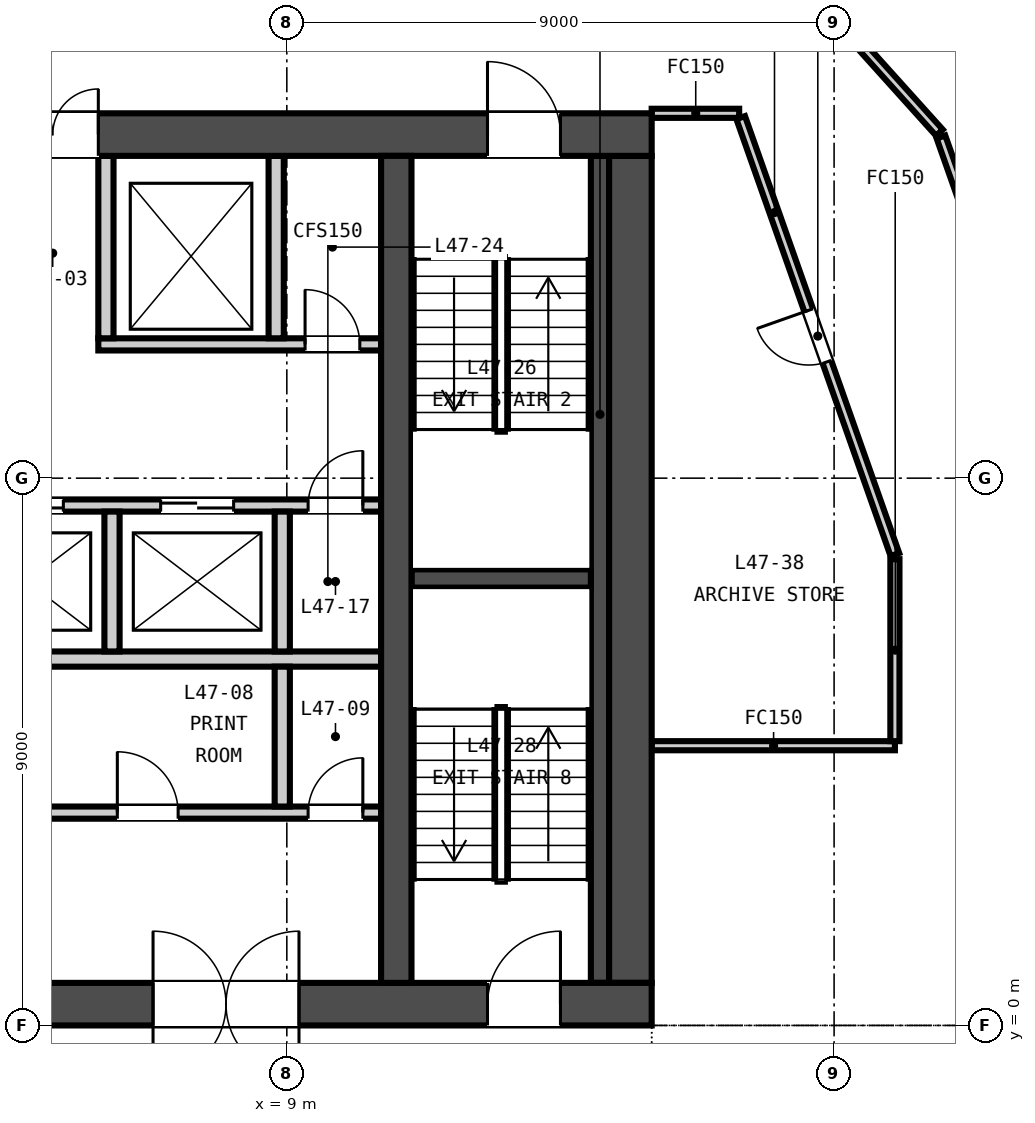
"""IFC4 building model, lengths in metres.
Left out: names, types, materials, properties, quantities, classifications, styles, units other than length and angle.
Written with IfcOpenShell. Run it as: python <this file> out.ifc"""

import sys

from ifc_helpers import new_model, si_unit, direction, frame, frame_2d, origin, place, context, subcontext, project, spatial, rectangle, extrude, element, fill, save


model = new_model("IFC4")
c1 = context("Model", 3, precision=1e-05, world=origin(), true_north=direction((0.0, 1.0)))
c2 = subcontext(c1, "Body", "Model", "MODEL_VIEW")
j1 = project(units=[si_unit("LENGTHUNIT", "METRE"), si_unit("PLANEANGLEUNIT", "RADIAN")], contexts=[c1])
p1 = place(None, origin())
s1 = spatial("IfcSite", under=j1, at=p1, CompositionType="ELEMENT")
p2 = place(p1, origin())
s2 = spatial("IfcBuilding", under=s1, at=p2, CompositionType="ELEMENT")
p3 = place(p2, frame((0.0, 0.0, 189.05)))
s3 = spatial("IfcBuildingStorey", under=s2, at=p3, CompositionType="ELEMENT", Elevation=189.05)
p4 = place(p3, frame((-15.0, 0.35, -0.15), z_axis=(0.0, 0.0, 1.0), x_axis=(1.0, 0.0, 0.0)))
e1 = element("IfcWall", 1, at=p4, inside=s3, PredefinedType="SOLIDWALL", context=c2, shape_type="SweptSolid", body=[
    extrude(rectangle(XDim=30.0, YDim=0.7, at=frame_2d((15.0, 0.0))), origin(), (0.0, 0.0, 1.0), 3.65),
])
p5 = place(p4, frame((5.8, 0.0, 0.15)))
e2 = element("IfcOpeningElement", 2, at=p5, cuts=e1, PredefinedType="OPENING", context=c2, shape_type="SweptSolid", body=[
    extrude(rectangle(XDim=2.4, YDim=2.4, at=frame_2d((1.2, 1.2))), frame((0.0, 0.36, 0.0), z_axis=(0.0, -1.0, 0.0), x_axis=(1.0, 0.0, 0.0)), (0.0, 0.0, 1.0), 0.72),
])
p6 = place(p4, frame((13.8, 0.0, 0.15)))
e3 = element("IfcOpeningElement", 3, at=p6, cuts=e1, PredefinedType="OPENING", context=c2, shape_type="SweptSolid", body=[
    extrude(rectangle(XDim=2.4, YDim=2.4, at=frame_2d((1.2, 1.2))), frame((0.0, 0.36, 0.0), z_axis=(0.0, -1.0, 0.0), x_axis=(1.0, 0.0, 0.0)), (0.0, 0.0, 1.0), 0.72),
])
p7 = place(p4, frame((21.8, 0.0, 0.15)))
e4 = element("IfcOpeningElement", 4, at=p7, cuts=e1, PredefinedType="OPENING", context=c2, shape_type="SweptSolid", body=[
    extrude(rectangle(XDim=2.4, YDim=2.4, at=frame_2d((1.2, 1.2))), frame((0.0, 0.36, 0.0), z_axis=(0.0, -1.0, 0.0), x_axis=(1.0, 0.0, 0.0)), (0.0, 0.0, 1.0), 0.72),
])
p8 = place(p4, frame((1.5, 0.0, 0.15)))
e5 = element("IfcOpeningElement", 5, at=p8, cuts=e1, PredefinedType="OPENING", context=c2, shape_type="SweptSolid", body=[
    extrude(rectangle(XDim=1.2, YDim=2.1, at=frame_2d((0.6, 1.05))), frame((0.0, 0.36, 0.0), z_axis=(0.0, -1.0, 0.0), x_axis=(1.0, 0.0, 0.0)), (0.0, 0.0, 1.0), 0.72),
])
p9 = place(p4, frame((27.3, 0.0, 0.15)))
e6 = element("IfcOpeningElement", 6, at=p9, cuts=e1, PredefinedType="OPENING", context=c2, shape_type="SweptSolid", body=[
    extrude(rectangle(XDim=1.2, YDim=2.1, at=frame_2d((0.6, 1.05))), frame((0.0, 0.36, 0.0), z_axis=(0.0, -1.0, 0.0), x_axis=(1.0, 0.0, 0.0)), (0.0, 0.0, 1.0), 0.72),
])
p10 = place(p3, frame((-15.0, 14.65, -0.15), z_axis=(0.0, 0.0, 1.0), x_axis=(1.0, 0.0, 0.0)))
e7 = element("IfcWall", 7, at=p10, inside=s3, PredefinedType="SOLIDWALL", context=c2, shape_type="SweptSolid", body=[
    extrude(rectangle(XDim=30.0, YDim=0.7, at=frame_2d((15.0, 0.0))), origin(), (0.0, 0.0, 1.0), 3.65),
])
p11 = place(p10, frame((9.25, 0.0, 0.15)))
e8 = element("IfcOpeningElement", 8, at=p11, cuts=e7, PredefinedType="OPENING", context=c2, shape_type="SweptSolid", body=[
    extrude(rectangle(XDim=1.5, YDim=2.1, at=frame_2d((0.75, 1.05))), frame((0.0, 0.36, 0.0), z_axis=(0.0, -1.0, 0.0), x_axis=(1.0, 0.0, 0.0)), (0.0, 0.0, 1.0), 0.72),
])
p12 = place(p10, frame((19.4, 0.0, 0.15)))
e9 = element("IfcOpeningElement", 9, at=p12, cuts=e7, PredefinedType="OPENING", context=c2, shape_type="SweptSolid", body=[
    extrude(rectangle(XDim=1.5, YDim=2.1, at=frame_2d((0.75, 1.05))), frame((0.0, 0.36, 0.0), z_axis=(0.0, -1.0, 0.0), x_axis=(1.0, 0.0, 0.0)), (0.0, 0.0, 1.0), 0.72),
])
p13 = place(p10, frame((1.5, 0.0, 0.15)))
e10 = element("IfcOpeningElement", 10, at=p13, cuts=e7, PredefinedType="OPENING", context=c2, shape_type="SweptSolid", body=[
    extrude(rectangle(XDim=1.2, YDim=2.1, at=frame_2d((0.6, 1.05))), frame((0.0, 0.36, 0.0), z_axis=(0.0, -1.0, 0.0), x_axis=(1.0, 0.0, 0.0)), (0.0, 0.0, 1.0), 0.72),
])
p14 = place(p10, frame((27.3, 0.0, 0.15)))
e11 = element("IfcOpeningElement", 11, at=p14, cuts=e7, PredefinedType="OPENING", context=c2, shape_type="SweptSolid", body=[
    extrude(rectangle(XDim=1.2, YDim=2.1, at=frame_2d((0.6, 1.05))), frame((0.0, 0.36, 0.0), z_axis=(0.0, -1.0, 0.0), x_axis=(1.0, 0.0, 0.0)), (0.0, 0.0, 1.0), 0.72),
])
p15 = place(p3, frame((14.65, 0.7, -0.15), z_axis=(0.0, 0.0, 1.0), x_axis=(0.0, 1.0, 0.0)))
e12 = element("IfcWall", 12, at=p15, inside=s3, PredefinedType="SOLIDWALL", context=c2, shape_type="SweptSolid", body=[
    extrude(rectangle(XDim=13.6, YDim=0.7, at=frame_2d((6.8, 0.0))), origin(), (0.0, 0.0, 1.0), 3.65),
])
p16 = place(p3, frame((10.8, 0.7, -0.15), z_axis=(0.0, 0.0, 1.0), x_axis=(0.0, 1.0, 0.0)))
e13 = element("IfcWall", 13, at=p16, inside=s3, PredefinedType="SOLIDWALL", context=c2, shape_type="SweptSolid", body=[
    extrude(rectangle(XDim=13.6, YDim=0.5, at=frame_2d((6.8, 0.0))), origin(), (0.0, 0.0, 1.0), 3.65),
])
p17 = place(p3, frame((-10.55, 3.5, 0.0), z_axis=(0.0, 0.0, 1.0), x_axis=(1.0, 0.0, 0.0)))
e14 = element("IfcWall", 14, at=p17, inside=s3, PredefinedType="PARTITIONING", context=c2, shape_type="SweptSolid", body=[
    extrude(rectangle(XDim=21.1, YDim=0.2, at=frame_2d((10.55, 0.0))), origin(), (0.0, 0.0, 1.0), 3.5),
])
p18 = place(p17, frame((1.113, 0.0, 0.0)))
e15 = element("IfcOpeningElement", 15, at=p18, cuts=e14, PredefinedType="OPENING", context=c2, shape_type="SweptSolid", body=[
    extrude(rectangle(XDim=1.0, YDim=2.1, at=frame_2d((0.5, 1.05))), frame((0.0, 0.11, 0.0), z_axis=(0.0, -1.0, 0.0), x_axis=(1.0, 0.0, 0.0)), (0.0, 0.0, 1.0), 0.22),
])
p19 = place(p17, frame((5.15, 0.0, 0.0)))
e16 = element("IfcOpeningElement", 16, at=p19, cuts=e14, PredefinedType="OPENING", context=c2, shape_type="SweptSolid", body=[
    extrude(rectangle(XDim=1.0, YDim=2.1, at=frame_2d((0.5, 1.05))), frame((0.0, 0.11, 0.0), z_axis=(0.0, -1.0, 0.0), x_axis=(1.0, 0.0, 0.0)), (0.0, 0.0, 1.0), 0.22),
])
p20 = place(p17, frame((9.85, 0.0, 0.0)))
e17 = element("IfcOpeningElement", 17, at=p20, cuts=e14, PredefinedType="OPENING", context=c2, shape_type="SweptSolid", body=[
    extrude(rectangle(XDim=1.0, YDim=2.1, at=frame_2d((0.5, 1.05))), frame((0.0, 0.11, 0.0), z_axis=(0.0, -1.0, 0.0), x_axis=(1.0, 0.0, 0.0)), (0.0, 0.0, 1.0), 0.22),
])
p21 = place(p17, frame((13.4, 0.0, 0.0)))
e18 = element("IfcOpeningElement", 18, at=p21, cuts=e14, PredefinedType="OPENING", context=c2, shape_type="SweptSolid", body=[
    extrude(rectangle(XDim=1.0, YDim=2.1, at=frame_2d((0.5, 1.05))), frame((0.0, 0.11, 0.0), z_axis=(0.0, -1.0, 0.0), x_axis=(1.0, 0.0, 0.0)), (0.0, 0.0, 1.0), 0.22),
])
p22 = place(p17, frame((16.762, 0.0, 0.0)))
e19 = element("IfcOpeningElement", 19, at=p22, cuts=e14, PredefinedType="OPENING", context=c2, shape_type="SweptSolid", body=[
    extrude(rectangle(XDim=1.0, YDim=2.1, at=frame_2d((0.5, 1.05))), frame((0.0, 0.11, 0.0), z_axis=(0.0, -1.0, 0.0), x_axis=(1.0, 0.0, 0.0)), (0.0, 0.0, 1.0), 0.22),
])
p23 = place(p17, frame((19.9, 0.0, 0.0)))
e20 = element("IfcOpeningElement", 20, at=p23, cuts=e14, PredefinedType="OPENING", context=c2, shape_type="SweptSolid", body=[
    extrude(rectangle(XDim=0.9, YDim=2.1, at=frame_2d((0.45, 1.05))), frame((0.0, 0.11, 0.0), z_axis=(0.0, -1.0, 0.0), x_axis=(1.0, 0.0, 0.0)), (0.0, 0.0, 1.0), 0.22),
])
p24 = place(p3, frame((-10.55, 6.025, 0.0), z_axis=(0.0, 0.0, 1.0), x_axis=(1.0, 0.0, 0.0)))
e21 = element("IfcWall", 21, at=p24, inside=s3, PredefinedType="PARTITIONING", context=c2, shape_type="SweptSolid", body=[
    extrude(rectangle(XDim=21.1, YDim=0.25, at=frame_2d((10.55, 0.0))), origin(), (0.0, 0.0, 1.0), 3.5),
])
p25 = place(p3, frame((-10.55, 8.55, 0.0), z_axis=(0.0, 0.0, 1.0), x_axis=(1.0, 0.0, 0.0)))
e22 = element("IfcWall", 22, at=p25, inside=s3, PredefinedType="PARTITIONING", context=c2, shape_type="SweptSolid", body=[
    extrude(rectangle(XDim=21.1, YDim=0.2, at=frame_2d((10.55, 0.0))), origin(), (0.0, 0.0, 1.0), 3.5),
])
p26 = place(p25, frame((0.675, 0.0, 0.0)))
e23 = element("IfcOpeningElement", 23, at=p26, cuts=e22, PredefinedType="OPENING", context=c2, shape_type="SweptSolid", body=[
    extrude(rectangle(XDim=1.2, YDim=2.1, at=frame_2d((0.6, 1.05))), frame((0.0, 0.11, 0.0), z_axis=(0.0, -1.0, 0.0), x_axis=(1.0, 0.0, 0.0)), (0.0, 0.0, 1.0), 0.22),
])
p27 = place(p25, frame((3.475, 0.0, 0.0)))
e24 = element("IfcOpeningElement", 24, at=p27, cuts=e22, PredefinedType="OPENING", context=c2, shape_type="SweptSolid", body=[
    extrude(rectangle(XDim=1.2, YDim=2.1, at=frame_2d((0.6, 1.05))), frame((0.0, 0.11, 0.0), z_axis=(0.0, -1.0, 0.0), x_axis=(1.0, 0.0, 0.0)), (0.0, 0.0, 1.0), 0.22),
])
p28 = place(p25, frame((6.275, 0.0, 0.0)))
e25 = element("IfcOpeningElement", 25, at=p28, cuts=e22, PredefinedType="OPENING", context=c2, shape_type="SweptSolid", body=[
    extrude(rectangle(XDim=1.2, YDim=2.1, at=frame_2d((0.6, 1.05))), frame((0.0, 0.11, 0.0), z_axis=(0.0, -1.0, 0.0), x_axis=(1.0, 0.0, 0.0)), (0.0, 0.0, 1.0), 0.22),
])
p29 = place(p25, frame((9.075, 0.0, 0.0)))
e26 = element("IfcOpeningElement", 26, at=p29, cuts=e22, PredefinedType="OPENING", context=c2, shape_type="SweptSolid", body=[
    extrude(rectangle(XDim=1.2, YDim=2.1, at=frame_2d((0.6, 1.05))), frame((0.0, 0.11, 0.0), z_axis=(0.0, -1.0, 0.0), x_axis=(1.0, 0.0, 0.0)), (0.0, 0.0, 1.0), 0.22),
])
p30 = place(p25, frame((11.875, 0.0, 0.0)))
e27 = element("IfcOpeningElement", 27, at=p30, cuts=e22, PredefinedType="OPENING", context=c2, shape_type="SweptSolid", body=[
    extrude(rectangle(XDim=1.2, YDim=2.1, at=frame_2d((0.6, 1.05))), frame((0.0, 0.11, 0.0), z_axis=(0.0, -1.0, 0.0), x_axis=(1.0, 0.0, 0.0)), (0.0, 0.0, 1.0), 0.22),
])
p31 = place(p25, frame((14.675, 0.0, 0.0)))
e28 = element("IfcOpeningElement", 28, at=p31, cuts=e22, PredefinedType="OPENING", context=c2, shape_type="SweptSolid", body=[
    extrude(rectangle(XDim=1.2, YDim=2.1, at=frame_2d((0.6, 1.05))), frame((0.0, 0.11, 0.0), z_axis=(0.0, -1.0, 0.0), x_axis=(1.0, 0.0, 0.0)), (0.0, 0.0, 1.0), 0.22),
])
p32 = place(p25, frame((17.475, 0.0, 0.0)))
e29 = element("IfcOpeningElement", 29, at=p32, cuts=e22, PredefinedType="OPENING", context=c2, shape_type="SweptSolid", body=[
    extrude(rectangle(XDim=1.2, YDim=2.1, at=frame_2d((0.6, 1.05))), frame((0.0, 0.11, 0.0), z_axis=(0.0, -1.0, 0.0), x_axis=(1.0, 0.0, 0.0)), (0.0, 0.0, 1.0), 0.22),
])
p33 = place(p25, frame((19.9, 0.0, 0.0)))
e30 = element("IfcOpeningElement", 30, at=p33, cuts=e22, PredefinedType="OPENING", context=c2, shape_type="SweptSolid", body=[
    extrude(rectangle(XDim=0.9, YDim=2.1, at=frame_2d((0.45, 1.05))), frame((0.0, 0.11, 0.0), z_axis=(0.0, -1.0, 0.0), x_axis=(1.0, 0.0, 0.0)), (0.0, 0.0, 1.0), 0.22),
])
p34 = place(p3, frame((5.9, 11.2, 0.0), z_axis=(0.0, 0.0, 1.0), x_axis=(1.0, 0.0, 0.0)))
e31 = element("IfcWall", 31, at=p34, inside=s3, PredefinedType="PARTITIONING", context=c2, shape_type="SweptSolid", body=[
    extrude(rectangle(XDim=4.65, YDim=0.2, at=frame_2d((2.325, 0.0))), origin(), (0.0, 0.0, 1.0), 3.5),
])
p35 = place(p34, frame((3.4, 0.0, 0.0)))
e32 = element("IfcOpeningElement", 32, at=p35, cuts=e31, PredefinedType="OPENING", context=c2, shape_type="SweptSolid", body=[
    extrude(rectangle(XDim=0.9, YDim=2.1, at=frame_2d((0.45, 1.05))), frame((0.0, 0.11, 0.0), z_axis=(0.0, -1.0, 0.0), x_axis=(1.0, 0.0, 0.0)), (0.0, 0.0, 1.0), 0.22),
])
p36 = place(p3, frame((8.925, 3.6, 0.0), z_axis=(0.0, 0.0, 1.0), x_axis=(0.0, 1.0, 0.0)))
e33 = element("IfcWall", 33, at=p36, inside=s3, PredefinedType="PARTITIONING", context=c2, shape_type="SweptSolid", body=[
    extrude(rectangle(XDim=2.3, YDim=0.25, at=frame_2d((1.15, 0.0))), origin(), (0.0, 0.0, 1.0), 3.5),
])
for number, where, z_axis, x_axis in (
    (34, (6.125, 6.15, 0.0), (0.0, 0.0, 1.0), (0.0, 1.0, 0.0)),
    (35, (8.925, 6.15, 0.0), (0.0, 0.0, 1.0), (0.0, 1.0, 0.0)),
):
    element("IfcWall", number, at=place(p3, frame(where, z_axis=z_axis, x_axis=x_axis)), inside=s3, PredefinedType="PARTITIONING", context=c2, shape_type="SweptSolid", body=[
        extrude(rectangle(XDim=2.3, YDim=0.25, at=frame_2d((1.15, 0.0))), origin(), (0.0, 0.0, 1.0), 3.5),
    ])
for number, where, z_axis, x_axis in (
    (36, (6.025, 11.3, 0.0), (0.0, 0.0, 1.0), (0.0, 1.0, 0.0)),
    (37, (8.825, 11.3, 0.0), (0.0, 0.0, 1.0), (0.0, 1.0, 0.0)),
):
    element("IfcWall", number, at=place(p3, frame(where, z_axis=z_axis, x_axis=x_axis)), inside=s3, PredefinedType="PARTITIONING", context=c2, shape_type="SweptSolid", body=[
        extrude(rectangle(XDim=3.0, YDim=0.25, at=frame_2d((1.5, 0.0))), origin(), (0.0, 0.0, 1.0), 3.5),
    ])
p37 = place(p3, frame((11.05, 7.35, 0.0), z_axis=(0.0, 0.0, 1.0), x_axis=(1.0, 0.0, 0.0)))
e38 = element("IfcWall", 38, at=p37, inside=s3, PredefinedType="SOLIDWALL", context=c2, shape_type="SweptSolid", body=[
    extrude(rectangle(XDim=2.95, YDim=0.3, at=frame_2d((1.475, 0.0))), origin(), (0.0, 0.0, 1.0), 3.5),
])
p38 = place(p3, frame((14.15, 0.7, 0.0), z_axis=(0.0, 0.0, 1.0), x_axis=(0.0, 1.0, 0.0)))
e39 = element("IfcWall", 39, at=p38, inside=s3, PredefinedType="SOLIDWALL", context=c2, shape_type="SweptSolid", body=[
    extrude(rectangle(XDim=13.6, YDim=0.3, at=frame_2d((6.8, 0.0))), origin(), (0.0, 0.0, 1.0), 3.5),
])
p39 = place(p3, frame((16.439, 15.0, 0.0), z_axis=(0.0, 0.0, 1.0), x_axis=(-1.0, 0.0, 0.0)))
e40 = element("IfcWall", 40, at=p39, inside=s3, PredefinedType="PARTITIONING", context=c2, shape_type="SweptSolid", body=[
    extrude(rectangle(XDim=1.439, YDim=0.15, at=frame_2d((0.719, 0.0))), origin(), (0.0, 0.0, 1.0), 2.741),
])
p40 = place(p3, frame((19.0, 7.743, 0.0), z_axis=(0.0, 0.0, 1.0), x_axis=(-0.332768168026, 0.943008667165, 0.0)))
e41 = element("IfcWall", 41, at=p40, inside=s3, PredefinedType="PARTITIONING", context=c2, shape_type="SweptSolid", body=[
    extrude(rectangle(XDim=7.621, YDim=0.15, at=frame_2d((3.81, 0.0))), origin(), (0.0, 0.0, 1.0), 2.741),
])
p41 = place(p40, frame((3.36, 0.0, 0.0)))
e42 = element("IfcOpeningElement", 42, at=p41, cuts=e41, PredefinedType="OPENING", context=c2, shape_type="SweptSolid", body=[
    extrude(rectangle(XDim=0.9, YDim=2.1, at=frame_2d((0.45, 1.05))), frame((0.0, 0.085, 0.0), z_axis=(0.0, -1.0, 0.0), x_axis=(1.0, 0.0, 0.0)), (0.0, 0.0, 1.0), 0.17),
])
p42 = place(p3, frame((16.795, 17.944, 0.0), z_axis=(0.0, 0.0, 1.0), x_axis=(0.66903540409, -0.743230534945, 0.0)))
e43 = element("IfcWall", 43, at=p42, inside=s3, PredefinedType="PARTITIONING", context=c2, shape_type="SweptSolid", body=[
    extrude(rectangle(XDim=4.39, YDim=0.15, at=frame_2d((2.195, 0.0))), origin(), (0.0, 0.0, 1.0), 2.741),
])
p43 = place(p3, frame((19.757, 14.611, 0.0), z_axis=(0.0, 0.0, 1.0), x_axis=(0.332898037941, -0.942962828713, 0.0)))
e44 = element("IfcWall", 44, at=p43, inside=s3, PredefinedType="PARTITIONING", context=c2, shape_type="SweptSolid", body=[
    extrude(rectangle(XDim=5.572, YDim=0.15, at=frame_2d((2.786, 0.0))), origin(), (0.0, 0.0, 1.0), 2.741),
])
p44 = place(p3, frame((15.0, 4.6, 0.0), z_axis=(0.0, 0.0, 1.0), x_axis=(1.0, 0.0, 0.0)))
e45 = element("IfcWall", 45, at=p44, inside=s3, PredefinedType="PARTITIONING", context=c2, shape_type="SweptSolid", body=[
    extrude(rectangle(XDim=4.0, YDim=0.15, at=frame_2d((2.0, 0.0))), origin(), (0.0, 0.0, 1.0), 2.741),
])
p45 = place(p3, frame((19.0, 4.675, 0.0), z_axis=(0.0, 0.0, 1.0), x_axis=(0.0, 1.0, 0.0)))
e46 = element("IfcWall", 46, at=p45, inside=s3, PredefinedType="PARTITIONING", context=c2, shape_type="SweptSolid", body=[
    extrude(rectangle(XDim=2.993, YDim=0.15, at=frame_2d((1.497, 0.0))), origin(), (0.0, 0.0, 1.0), 2.741),
])
p46 = place(p22, origin())
e47 = element("IfcDoor", 47, at=p46, inside=s3, OperationType="SINGLE_SWING_LEFT", PredefinedType="DOOR", context=c2, shape_type="SweptSolid", body=[
    extrude(rectangle(XDim=1.0, YDim=2.1, at=frame_2d((0.5, 1.05))), frame((0.0, 0.025, 0.0), z_axis=(0.0, -1.0, 0.0), x_axis=(1.0, 0.0, 0.0)), (0.0, 0.0, 1.0), 0.05),
])
fill(e19, e47)
p47 = place(p23, origin())
e48 = element("IfcDoor", 48, at=p47, inside=s3, OperationType="SINGLE_SWING_RIGHT", PredefinedType="DOOR", context=c2, shape_type="SweptSolid", body=[
    extrude(rectangle(XDim=0.9, YDim=2.1, at=frame_2d((0.45, 1.05))), frame((0.0, 0.025, 0.0), z_axis=(0.0, -1.0, 0.0), x_axis=(1.0, 0.0, 0.0)), (0.0, 0.0, 1.0), 0.05),
])
fill(e20, e48)
p48 = place(p31, origin())
e49 = element("IfcDoor", 49, at=p48, inside=s3, OperationType="DOUBLE_DOOR_SLIDING", PredefinedType="DOOR", context=c2, shape_type="SweptSolid", body=[
    extrude(rectangle(XDim=1.2, YDim=2.1, at=frame_2d((0.6, 1.05))), frame((0.0, 0.025, 0.0), z_axis=(0.0, -1.0, 0.0), x_axis=(1.0, 0.0, 0.0)), (0.0, 0.0, 1.0), 0.05),
])
fill(e28, e49)
p49 = place(p32, origin())
e50 = element("IfcDoor", 50, at=p49, inside=s3, OperationType="DOUBLE_DOOR_SLIDING", PredefinedType="DOOR", context=c2, shape_type="SweptSolid", body=[
    extrude(rectangle(XDim=1.2, YDim=2.1, at=frame_2d((0.6, 1.05))), frame((0.0, 0.025, 0.0), z_axis=(0.0, -1.0, 0.0), x_axis=(1.0, 0.0, 0.0)), (0.0, 0.0, 1.0), 0.05),
])
fill(e29, e50)
p50 = place(p33, origin())
e51 = element("IfcDoor", 51, at=p50, inside=s3, OperationType="SINGLE_SWING_RIGHT", PredefinedType="DOOR", context=c2, shape_type="SweptSolid", body=[
    extrude(rectangle(XDim=0.9, YDim=2.1, at=frame_2d((0.45, 1.05))), frame((0.0, 0.025, 0.0), z_axis=(0.0, -1.0, 0.0), x_axis=(1.0, 0.0, 0.0)), (0.0, 0.0, 1.0), 0.05),
])
fill(e30, e51)
p51 = place(p35, origin())
e52 = element("IfcDoor", 52, at=p51, inside=s3, OperationType="SINGLE_SWING_LEFT", PredefinedType="DOOR", context=c2, shape_type="SweptSolid", body=[
    extrude(rectangle(XDim=0.9, YDim=2.1, at=frame_2d((0.45, 1.05))), frame((0.0, 0.025, 0.0), z_axis=(0.0, -1.0, 0.0), x_axis=(1.0, 0.0, 0.0)), (0.0, 0.0, 1.0), 0.05),
])
fill(e32, e52)
p52 = place(p7, origin())
e53 = element("IfcDoor", 53, at=p52, inside=s3, OperationType="DOUBLE_DOOR_DOUBLE_SWING", PredefinedType="DOOR", context=c2, shape_type="SweptSolid", body=[
    extrude(rectangle(XDim=2.4, YDim=2.4, at=frame_2d((1.2, 1.2))), frame((0.0, 0.025, 0.0), z_axis=(0.0, -1.0, 0.0), x_axis=(1.0, 0.0, 0.0)), (0.0, 0.0, 1.0), 0.05),
])
fill(e4, e53)
p53 = place(p12, origin())
e54 = element("IfcDoor", 54, at=p53, inside=s3, OperationType="DOUBLE_DOOR_SINGLE_SWING", PredefinedType="DOOR", context=c2, shape_type="SweptSolid", body=[
    extrude(rectangle(XDim=1.5, YDim=2.1, at=frame_2d((0.75, 1.05))), frame((0.0, 0.025, 0.0), z_axis=(0.0, -1.0, 0.0), x_axis=(1.0, 0.0, 0.0)), (0.0, 0.0, 1.0), 0.05),
])
fill(e9, e54)
p54 = place(p14, origin())
e55 = element("IfcDoor", 55, at=p54, inside=s3, OperationType="SINGLE_SWING_LEFT", PredefinedType="DOOR", context=c2, shape_type="SweptSolid", body=[
    extrude(rectangle(XDim=1.2, YDim=2.1, at=frame_2d((0.6, 1.05))), frame((0.0, 0.025, 0.0), z_axis=(0.0, -1.0, 0.0), x_axis=(1.0, 0.0, 0.0)), (0.0, 0.0, 1.0), 0.05),
])
fill(e11, e55)
p55 = place(p9, origin())
e56 = element("IfcDoor", 56, at=p55, inside=s3, OperationType="SINGLE_SWING_RIGHT", PredefinedType="DOOR", context=c2, shape_type="SweptSolid", body=[
    extrude(rectangle(XDim=1.2, YDim=2.1, at=frame_2d((0.6, 1.05))), frame((0.0, 0.025, 0.0), z_axis=(0.0, -1.0, 0.0), x_axis=(1.0, 0.0, 0.0)), (0.0, 0.0, 1.0), 0.05),
])
fill(e6, e56)
p56 = place(p41, origin())
e57 = element("IfcDoor", 57, at=p56, inside=s3, OperationType="SINGLE_SWING_RIGHT", PredefinedType="DOOR", context=c2, shape_type="SweptSolid", body=[
    extrude(rectangle(XDim=0.9, YDim=2.1, at=frame_2d((0.45, 1.05))), frame((0.0, 0.025, 0.0), z_axis=(0.0, -1.0, 0.0), x_axis=(1.0, 0.0, 0.0)), (0.0, 0.0, 1.0), 0.05),
])
fill(e42, e57)
save(model, sys.argv[1])
